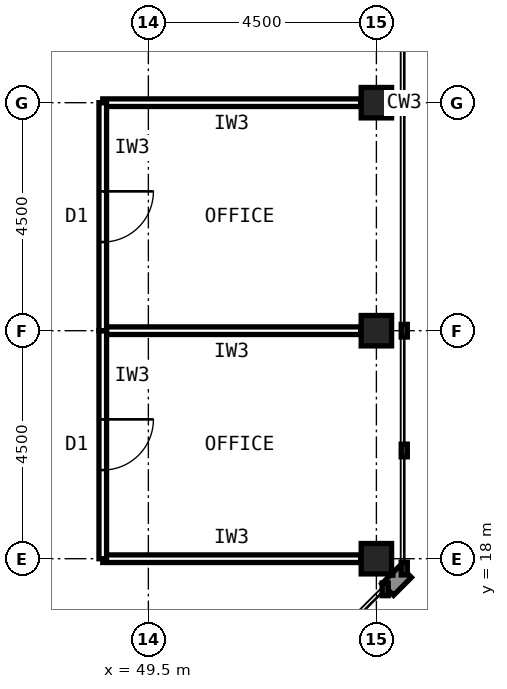
"""IFC4 building model, lengths in metres.
Left out: names, types, materials, properties, quantities, classifications, styles, units other than length and angle.
Written with IfcOpenShell. Run it as: python <this file> out.ifc"""

import sys

from ifc_helpers import new_model, si_unit, direction, frame, frame_2d, origin, origin_2d, place, context, subcontext, project, spatial, rectangle, hollow_rectangle, extrude, element, fill, save


model = new_model("IFC4")
c1 = context("Model", 3, precision=1e-05, world=origin(), true_north=direction((0.0, 1.0)))
c2 = subcontext(c1, "Body", "Model", "MODEL_VIEW")
j1 = project(units=[si_unit("LENGTHUNIT", "METRE"), si_unit("PLANEANGLEUNIT", "RADIAN")], contexts=[c1])
p1 = place(None, origin())
s1 = spatial("IfcSite", under=j1, at=p1, CompositionType="ELEMENT")
p2 = place(p1, origin())
s2 = spatial("IfcBuilding", under=s1, at=p2, CompositionType="ELEMENT")
p3 = place(p2, frame((0.0, 0.0, 270.6)))
s3 = spatial("IfcBuildingStorey", under=s2, at=p3, CompositionType="ELEMENT", Elevation=270.6)
for number, where, z_axis, x_axis in (
    (1, (54.0, 18.0, 0.0), (0.0, 0.0, 1.0), (1.0, 0.0, 0.0)),
    (2, (54.0, 22.5, 0.0), (0.0, 0.0, 1.0), (1.0, 0.0, 0.0)),
    (3, (54.0, 27.0, 0.0), (0.0, 0.0, 1.0), (1.0, 0.0, 0.0)),
):
    element("IfcColumn", number, at=place(p3, frame(where, z_axis=z_axis, x_axis=x_axis)), inside=s3, PredefinedType="COLUMN", context=c2, shape_type="SweptSolid", body=[
        extrude(hollow_rectangle(XDim=0.6, YDim=0.6, WallThickness=0.028, at=origin_2d()), origin(), (0.0, 0.0, 1.0), 4.0),
    ])
for number, where, z_axis, x_axis in (
    (4, (48.6, 18.0, 0.0), (0.0, 0.0, 1.0), (1.0, 0.0, 0.0)),
    (5, (53.69, 22.5, 0.0), (0.0, 0.0, 1.0), (-1.0, 0.0, 0.0)),
):
    element("IfcWall", number, at=place(p3, frame(where, z_axis=z_axis, x_axis=x_axis)), inside=s3, PredefinedType="PARTITIONING", context=c2, shape_type="SweptSolid", body=[
        extrude(rectangle(XDim=5.09, YDim=0.15, at=frame_2d((2.545, 0.0))), origin(), (0.0, 0.0, 1.0), 2.989),
    ])
p4 = place(p3, frame((48.6, 22.5, 0.0), z_axis=(0.0, 0.0, 1.0), x_axis=(0.0, -1.0, 0.0)))
e6 = element("IfcWall", 6, at=p4, inside=s3, PredefinedType="PARTITIONING", context=c2, shape_type="SweptSolid", body=[
    extrude(rectangle(XDim=4.5, YDim=0.15, at=frame_2d((2.25, 0.0))), origin(), (0.0, 0.0, 1.0), 3.84),
])
p5 = place(p4, frame((1.75, 0.0, 0.0)))
e7 = element("IfcOpeningElement", 7, at=p5, cuts=e6, PredefinedType="OPENING", context=c2, shape_type="SweptSolid", body=[
    extrude(rectangle(XDim=1.0, YDim=2.1, at=frame_2d((0.5, 1.05))), frame((0.0, 0.085, 0.0), z_axis=(0.0, -1.0, 0.0), x_axis=(1.0, 0.0, 0.0)), (0.0, 0.0, 1.0), 0.17),
])
p6 = place(p3, frame((53.69, 27.0, 0.0), z_axis=(0.0, 0.0, 1.0), x_axis=(-1.0, 0.0, 0.0)))
e8 = element("IfcWall", 8, at=p6, inside=s3, PredefinedType="PARTITIONING", context=c2, shape_type="SweptSolid", body=[
    extrude(rectangle(XDim=5.09, YDim=0.15, at=frame_2d((2.545, 0.0))), origin(), (0.0, 0.0, 1.0), 2.989),
])
p7 = place(p3, frame((48.6, 27.0, 0.0), z_axis=(0.0, 0.0, 1.0), x_axis=(0.0, -1.0, 0.0)))
e9 = element("IfcWall", 9, at=p7, inside=s3, PredefinedType="PARTITIONING", context=c2, shape_type="SweptSolid", body=[
    extrude(rectangle(XDim=4.5, YDim=0.15, at=frame_2d((2.25, 0.0))), origin(), (0.0, 0.0, 1.0), 3.84),
])
p8 = place(p7, frame((1.75, 0.0, 0.0)))
e10 = element("IfcOpeningElement", 10, at=p8, cuts=e9, PredefinedType="OPENING", context=c2, shape_type="SweptSolid", body=[
    extrude(rectangle(XDim=1.0, YDim=2.1, at=frame_2d((0.5, 1.05))), frame((0.0, 0.085, 0.0), z_axis=(0.0, -1.0, 0.0), x_axis=(1.0, 0.0, 0.0)), (0.0, 0.0, 1.0), 0.17),
])
p9 = place(p5, origin())
e11 = element("IfcDoor", 11, at=p9, inside=s3, OperationType="SINGLE_SWING_LEFT", PredefinedType="DOOR", context=c2, shape_type="SweptSolid", body=[
    extrude(rectangle(XDim=1.0, YDim=2.1, at=frame_2d((0.5, 1.05))), frame((0.0, 0.025, 0.0), z_axis=(0.0, -1.0, 0.0), x_axis=(1.0, 0.0, 0.0)), (0.0, 0.0, 1.0), 0.05),
])
fill(e7, e11)
p10 = place(p8, origin())
e12 = element("IfcDoor", 12, at=p10, inside=s3, OperationType="SINGLE_SWING_LEFT", PredefinedType="DOOR", context=c2, shape_type="SweptSolid", body=[
    extrude(rectangle(XDim=1.0, YDim=2.1, at=frame_2d((0.5, 1.05))), frame((0.0, 0.025, 0.0), z_axis=(0.0, -1.0, 0.0), x_axis=(1.0, 0.0, 0.0)), (0.0, 0.0, 1.0), 0.05),
])
fill(e10, e12)
save(model, sys.argv[1])
